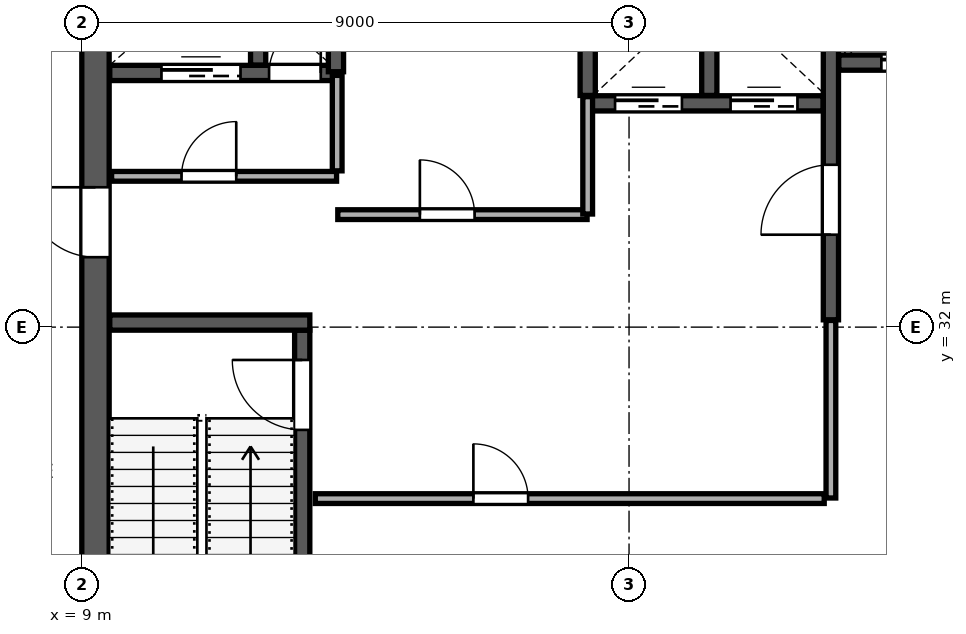
"""IFC4 building model, lengths in metres.
Left out: names, types, materials, properties, quantities, classifications, styles, units other than length and angle.
Written with IfcOpenShell. Run it as: python <this file> out.ifc"""

import sys

from ifc_helpers import new_model, si_unit, direction, frame, frame_2d, origin, place, context, subcontext, project, spatial, rectangle, extrude, source, transform, mapped, element, fill, save


model = new_model("IFC4")
c1 = context("Model", 3, precision=1e-05, world=origin(), true_north=direction((0.0, 1.0)))
c2 = subcontext(c1, "Body", "Model", "MODEL_VIEW")
j1 = project(units=[si_unit("LENGTHUNIT", "METRE"), si_unit("PLANEANGLEUNIT", "RADIAN")], contexts=[c1])
p1 = place(None, origin())
s1 = spatial("IfcSite", under=j1, at=p1, CompositionType="ELEMENT")
p2 = place(p1, origin())
s2 = spatial("IfcBuilding", under=s1, at=p2, CompositionType="ELEMENT")
p3 = place(p2, frame((0.0, 0.0, 254.2)))
s3 = spatial("IfcBuildingStorey", under=s2, at=p3, CompositionType="ELEMENT", Elevation=254.2)
p4 = place(p3, frame((9.225, 24.45, 0.0), z_axis=(0.0, 0.0, 1.0), x_axis=(0.0, 1.0, 0.0)))
e1 = element("IfcWall", 1, at=p4, inside=s3, PredefinedType="SHEAR", context=c2, shape_type="SweptSolid", body=[
    extrude(rectangle(XDim=15.1, YDim=0.45, at=frame_2d((7.55, 0.0))), origin(), (0.0, 0.0, 1.0), 3.96),
])
p5 = place(p4, frame((8.7, 0.0, 0.0)))
e2 = element("IfcOpeningElement", 2, at=p5, cuts=e1, PredefinedType="OPENING", context=c2, shape_type="SweptSolid", body=[
    extrude(rectangle(XDim=1.15, YDim=2.2, at=frame_2d((0.575, 1.1))), frame((0.0, 0.235, 0.0), z_axis=(0.0, -1.0, 0.0), x_axis=(1.0, 0.0, 0.0)), (0.0, 0.0, 1.0), 0.47),
])
p6 = place(p3, frame((12.625, 24.46, 0.0), z_axis=(0.0, 0.0, 1.0), x_axis=(0.0, 1.0, 0.0)))
e3 = element("IfcWall", 3, at=p6, inside=s3, PredefinedType="SHEAR", context=c2, shape_type="SweptSolid", body=[
    extrude(rectangle(XDim=7.49, YDim=0.25, at=frame_2d((3.745, 0.0))), origin(), (0.0, 0.0, 1.0), 3.96),
])
p7 = place(p6, frame((5.85, 0.0, 0.0)))
e4 = element("IfcOpeningElement", 4, at=p7, cuts=e3, PredefinedType="OPENING", context=c2, shape_type="SweptSolid", body=[
    extrude(rectangle(XDim=1.15, YDim=2.2, at=frame_2d((0.575, 1.1))), frame((0.0, 0.135, 0.0), z_axis=(0.0, -1.0, 0.0), x_axis=(1.0, 0.0, 0.0)), (0.0, 0.0, 1.0), 0.27),
])
p8 = place(p3, frame((9.46, 32.075, 0.0), z_axis=(0.0, 0.0, 1.0), x_axis=(1.0, 0.0, 0.0)))
e5 = element("IfcWall", 5, at=p8, inside=s3, PredefinedType="SHEAR", context=c2, shape_type="SweptSolid", body=[
    extrude(rectangle(XDim=3.29, YDim=0.25, at=frame_2d((1.645, 0.0))), origin(), (0.0, 0.0, 1.0), 3.96),
])
p9 = place(p3, frame((21.32, 32.12, 0.0), z_axis=(0.0, 0.0, 1.0), x_axis=(0.0, 1.0, 0.0)))
e6 = element("IfcWall", 6, at=p9, inside=s3, PredefinedType="SHEAR", context=c2, shape_type="SweptSolid", body=[
    extrude(rectangle(XDim=7.42, YDim=0.25, at=frame_2d((3.71, 0.0))), origin(), (0.0, 0.0, 1.0), 3.96),
])
p10 = place(p9, frame((1.4, 0.0, 0.0)))
e7 = element("IfcOpeningElement", 7, at=p10, cuts=e6, PredefinedType="OPENING", context=c2, shape_type="SweptSolid", body=[
    extrude(rectangle(XDim=1.15, YDim=2.2, at=frame_2d((0.575, 1.1))), frame((0.0, 0.135, 0.0), z_axis=(0.0, -1.0, 0.0), x_axis=(1.0, 0.0, 0.0)), (0.0, 0.0, 1.0), 0.27),
])
p11 = place(p3, frame((9.46, 36.18, 0.0), z_axis=(0.0, 0.0, 1.0), x_axis=(1.0, 0.0, 0.0)))
e8 = element("IfcWall", 8, at=p11, inside=s3, PredefinedType="SHEAR", context=c2, shape_type="SweptSolid", body=[
    extrude(rectangle(XDim=3.79, YDim=0.25, at=frame_2d((1.895, 0.0))), origin(), (0.0, 0.0, 1.0), 3.96),
])
p12 = place(p11, frame((2.62, 0.0, 0.0)))
e9 = element("IfcOpeningElement", 9, at=p12, cuts=e8, PredefinedType="OPENING", context=c2, shape_type="SweptSolid", body=[
    extrude(rectangle(XDim=0.85, YDim=2.1, at=frame_2d((0.425, 1.05))), frame((0.0, 0.135, 0.0), z_axis=(0.0, -1.0, 0.0), x_axis=(1.0, 0.0, 0.0)), (0.0, 0.0, 1.0), 0.27),
])
p13 = place(p11, frame((0.85, 0.0, 0.0)))
e10 = element("IfcOpeningElement", 10, at=p13, cuts=e8, PredefinedType="OPENING", context=c2, shape_type="SweptSolid", body=[
    extrude(rectangle(XDim=1.3, YDim=2.25, at=frame_2d((0.65, 1.125))), frame((0.0, 0.135, 0.0), z_axis=(0.0, -1.0, 0.0), x_axis=(1.0, 0.0, 0.0)), (0.0, 0.0, 1.0), 0.27),
])
p14 = place(p3, frame((11.9, 36.31, 0.0), z_axis=(0.0, 0.0, 1.0), x_axis=(0.0, 1.0, 0.0)))
e11 = element("IfcWall", 11, at=p14, inside=s3, PredefinedType="SHEAR", context=c2, shape_type="SweptSolid", body=[
    extrude(rectangle(XDim=3.23, YDim=0.25, at=frame_2d((1.615, 0.0))), origin(), (0.0, 0.0, 1.0), 3.96),
])
p15 = place(p3, frame((21.45, 36.35, 0.0), z_axis=(0.0, 0.0, 1.0), x_axis=(1.0, 0.0, 0.0)))
e12 = element("IfcWall", 12, at=p15, inside=s3, PredefinedType="SHEAR", context=c2, shape_type="SweptSolid", body=[
    extrude(rectangle(XDim=5.09, YDim=0.25, at=frame_2d((2.545, 0.0))), origin(), (0.0, 0.0, 1.0), 3.96),
])
p16 = place(p15, frame((0.7, 0.0, 0.0)))
e13 = element("IfcOpeningElement", 13, at=p16, cuts=e12, PredefinedType="OPENING", context=c2, shape_type="SweptSolid", body=[
    extrude(rectangle(XDim=1.2, YDim=2.2, at=frame_2d((0.6, 1.1))), frame((0.0, 0.135, 0.0), z_axis=(0.0, -1.0, 0.0), x_axis=(1.0, 0.0, 0.0)), (0.0, 0.0, 1.0), 0.27),
])
p17 = place(p15, frame((3.25, 0.0, 0.0)))
e14 = element("IfcOpeningElement", 14, at=p17, cuts=e12, PredefinedType="OPENING", context=c2, shape_type="SweptSolid", body=[
    extrude(rectangle(XDim=1.2, YDim=2.2, at=frame_2d((0.6, 1.1))), frame((0.0, 0.135, 0.0), z_axis=(0.0, -1.0, 0.0), x_axis=(1.0, 0.0, 0.0)), (0.0, 0.0, 1.0), 0.27),
])
p18 = place(p3, frame((13.18, 36.2, 0.0), z_axis=(0.0, 0.0, 1.0), x_axis=(0.0, 1.0, 0.0)))
e15 = element("IfcWall", 15, at=p18, inside=s3, PredefinedType="SHEAR", context=c2, shape_type="SweptSolid", body=[
    extrude(rectangle(XDim=3.34, YDim=0.25, at=frame_2d((1.67, 0.0))), origin(), (0.0, 0.0, 1.0), 3.96),
])
p19 = place(p3, frame((17.32, 35.68, 0.0), z_axis=(0.0, 0.0, 1.0), x_axis=(1.0, 0.0, 0.0)))
e16 = element("IfcWall", 16, at=p19, inside=s3, PredefinedType="SHEAR", context=c2, shape_type="SweptSolid", body=[
    extrude(rectangle(XDim=3.87, YDim=0.25, at=frame_2d((1.935, 0.0))), origin(), (0.0, 0.0, 1.0), 3.96),
])
p20 = place(p19, frame((0.45, 0.0, 0.0)))
e17 = element("IfcOpeningElement", 17, at=p20, cuts=e16, PredefinedType="OPENING", context=c2, shape_type="SweptSolid", body=[
    extrude(rectangle(XDim=1.1, YDim=2.2, at=frame_2d((0.55, 1.1))), frame((0.0, 0.135, 0.0), z_axis=(0.0, -1.0, 0.0), x_axis=(1.0, 0.0, 0.0)), (0.0, 0.0, 1.0), 0.27),
])
p21 = place(p19, frame((2.35, 0.0, 0.0)))
e18 = element("IfcOpeningElement", 18, at=p21, cuts=e16, PredefinedType="OPENING", context=c2, shape_type="SweptSolid", body=[
    extrude(rectangle(XDim=1.1, YDim=2.2, at=frame_2d((0.55, 1.1))), frame((0.0, 0.135, 0.0), z_axis=(0.0, -1.0, 0.0), x_axis=(1.0, 0.0, 0.0)), (0.0, 0.0, 1.0), 0.27),
])
for number, where, z_axis, x_axis in (
    (19, (17.32, 35.81, 0.0), (0.0, 0.0, 1.0), (0.0, 1.0, 0.0)),
    (20, (19.32, 35.81, 0.0), (0.0, 0.0, 1.0), (0.0, 1.0, 0.0)),
):
    element("IfcWall", number, at=place(p3, frame(where, z_axis=z_axis, x_axis=x_axis)), inside=s3, PredefinedType="SHEAR", context=c2, shape_type="SweptSolid", body=[
        extrude(rectangle(XDim=3.73, YDim=0.25, at=frame_2d((1.865, 0.0))), origin(), (0.0, 0.0, 1.0), 3.96),
    ])
p22 = place(p3, frame((9.49, 34.48, 0.0), z_axis=(0.0, 0.0, 1.0), x_axis=(1.0, 0.0, 0.0)))
e21 = element("IfcWall", 21, at=p22, inside=s3, PredefinedType="PARTITIONING", context=c2, shape_type="SweptSolid", body=[
    extrude(rectangle(XDim=3.7, YDim=0.16, at=frame_2d((1.85, 0.0))), origin(), (0.0, 0.0, 1.0), 3.96),
])
p23 = place(p22, frame((1.15, 0.0, 0.0)))
e22 = element("IfcOpeningElement", 22, at=p23, cuts=e21, PredefinedType="OPENING", context=c2, shape_type="SweptSolid", body=[
    extrude(rectangle(XDim=0.9, YDim=2.15, at=frame_2d((0.45, 1.075))), frame((0.0, 0.09, 0.0), z_axis=(0.0, -1.0, 0.0), x_axis=(1.0, 0.0, 0.0)), (0.0, 0.0, 1.0), 0.18),
])
p24 = place(p3, frame((13.2, 34.57, 0.0), z_axis=(0.0, 0.0, 1.0), x_axis=(0.0, 1.0, 0.0)))
e23 = element("IfcWall", 23, at=p24, inside=s3, PredefinedType="PARTITIONING", context=c2, shape_type="SweptSolid", body=[
    extrude(rectangle(XDim=1.57, YDim=0.16, at=frame_2d((0.785, 0.0))), origin(), (0.0, 0.0, 1.0), 3.96),
])
p25 = place(p3, frame((13.21, 33.85, 0.0), z_axis=(0.0, 0.0, 1.0), x_axis=(1.0, 0.0, 0.0)))
e24 = element("IfcWall", 24, at=p25, inside=s3, PredefinedType="PARTITIONING", context=c2, shape_type="SweptSolid", body=[
    extrude(rectangle(XDim=4.1, YDim=0.16, at=frame_2d((2.05, 0.0))), origin(), (0.0, 0.0, 1.0), 3.96),
])
p26 = place(p25, frame((1.35, 0.0, 0.0)))
e25 = element("IfcOpeningElement", 25, at=p26, cuts=e24, PredefinedType="OPENING", context=c2, shape_type="SweptSolid", body=[
    extrude(rectangle(XDim=0.9, YDim=2.15, at=frame_2d((0.45, 1.075))), frame((0.0, 0.09, 0.0), z_axis=(0.0, -1.0, 0.0), x_axis=(1.0, 0.0, 0.0)), (0.0, 0.0, 1.0), 0.18),
])
p27 = place(p3, frame((17.32, 33.86, 0.0), z_axis=(0.0, 0.0, 1.0), x_axis=(0.0, 1.0, 0.0)))
e26 = element("IfcWall", 26, at=p27, inside=s3, PredefinedType="PARTITIONING", context=c2, shape_type="SweptSolid", body=[
    extrude(rectangle(XDim=1.93, YDim=0.16, at=frame_2d((0.965, 0.0))), origin(), (0.0, 0.0, 1.0), 3.96),
])
p28 = place(p3, frame((12.84, 29.18, 0.0), z_axis=(0.0, 0.0, 1.0), x_axis=(1.0, 0.0, 0.0)))
e27 = element("IfcWall", 27, at=p28, inside=s3, PredefinedType="PARTITIONING", context=c2, shape_type="SweptSolid", body=[
    extrude(rectangle(XDim=8.37, YDim=0.16, at=frame_2d((4.185, 0.0))), origin(), (0.0, 0.0, 1.0), 3.96),
])
p29 = place(p28, frame((2.6, 0.0, 0.0)))
e28 = element("IfcOpeningElement", 28, at=p29, cuts=e27, PredefinedType="OPENING", context=c2, shape_type="SweptSolid", body=[
    extrude(rectangle(XDim=0.9, YDim=2.15, at=frame_2d((0.45, 1.075))), frame((0.0, 0.09, 0.0), z_axis=(0.0, -1.0, 0.0), x_axis=(1.0, 0.0, 0.0)), (0.0, 0.0, 1.0), 0.18),
])
p30 = place(p3, frame((21.32, 29.19, 0.0), z_axis=(0.0, 0.0, 1.0), x_axis=(0.0, 1.0, 0.0)))
e29 = element("IfcWall", 29, at=p30, inside=s3, PredefinedType="PARTITIONING", context=c2, shape_type="SweptSolid", body=[
    extrude(rectangle(XDim=2.92, YDim=0.16, at=frame_2d((1.46, 0.0))), origin(), (0.0, 0.0, 1.0), 3.96),
])
p31 = place(p3, frame((4.203, 28.778, 0.0), z_axis=(0.0, 0.0, 1.0), x_axis=(0.675591041558, -0.737276572642, 0.0)))
e30 = element("IfcWall", 30, at=p31, inside=s3, PredefinedType="PARTITIONING", context=c2, shape_type="SweptSolid", body=[
    extrude(rectangle(XDim=14.07, YDim=0.16, at=frame_2d((7.035, 0.0))), origin(), (0.0, 0.0, 1.0), 3.96),
])
p32 = place(p31, frame((1.15, 0.0, 0.0)))
e31 = element("IfcOpeningElement", 31, at=p32, cuts=e30, PredefinedType="OPENING", context=c2, shape_type="SweptSolid", body=[
    extrude(rectangle(XDim=0.95, YDim=2.15, at=frame_2d((0.475, 1.075))), frame((0.0, 0.09, 0.0), z_axis=(0.0, -1.0, 0.0), x_axis=(1.0, 0.0, 0.0)), (0.0, 0.0, 1.0), 0.18),
])
p33 = place(p3, frame((19.042, 50.92, 0.0), z_axis=(0.0, 0.0, 1.0), x_axis=(0.675589646996, -0.737277850523, 0.0)))
e32 = element("IfcWall", 32, at=p33, inside=s3, PredefinedType="PARTITIONING", context=c2, shape_type="SweptSolid", body=[
    extrude(rectangle(XDim=21.87, YDim=0.135, at=frame_2d((10.935, 0.0))), origin(), (0.0, 0.0, 1.0), 3.96),
])
p34 = place(p33, frame((5.4, 0.0, 0.0)))
e33 = element("IfcOpeningElement", 33, at=p34, cuts=e32, PredefinedType="OPENING", context=c2, shape_type="SweptSolid", body=[
    extrude(rectangle(XDim=0.95, YDim=2.15, at=frame_2d((0.475, 1.075))), frame((0.0, 0.078, 0.0), z_axis=(0.0, -1.0, 0.0), x_axis=(1.0, 0.0, 0.0)), (0.0, 0.0, 1.0), 0.155),
])
p35 = place(p33, frame((9.4, 0.0, 0.0)))
e34 = element("IfcOpeningElement", 34, at=p35, cuts=e32, PredefinedType="OPENING", context=c2, shape_type="SweptSolid", body=[
    extrude(rectangle(XDim=0.95, YDim=2.15, at=frame_2d((0.475, 1.075))), frame((0.0, 0.078, 0.0), z_axis=(0.0, -1.0, 0.0), x_axis=(1.0, 0.0, 0.0)), (0.0, 0.0, 1.0), 0.155),
])
p36 = place(p3, frame((1.393, 34.124, 0.0), z_axis=(0.0, 0.0, 1.0), x_axis=(0.737274323436, 0.675593496121, 0.0)))
e35 = element("IfcWall", 35, at=p36, inside=s3, PredefinedType="PARTITIONING", context=c2, shape_type="SweptSolid", body=[
    extrude(rectangle(XDim=27.402, YDim=0.135, at=frame_2d((13.701, 0.0))), origin(), (0.0, 0.0, 1.0), 3.96),
])
m1 = source(origin(), c2, "Body", "SweptSolid", [
    extrude(rectangle(XDim=1.15, YDim=2.2, at=frame_2d((0.575, 1.1))), frame((0.0, 0.025, 0.0), z_axis=(0.0, -1.0, 0.0), x_axis=(1.0, 0.0, 0.0)), (0.0, 0.0, 1.0), 0.05),
])
p37 = place(p7, origin())
e36 = element("IfcDoor", 36, at=p37, inside=s3, OperationType="SINGLE_SWING_RIGHT", PredefinedType="DOOR", context=c2, shape_type="MappedRepresentation", body=[
    mapped(m1, transform((0.0, 0.0, 0.0), scale=1.0)),
])
fill(e4, e36)
m2 = source(origin(), c2, "Body", "SweptSolid", [
    extrude(rectangle(XDim=1.15, YDim=2.2, at=frame_2d((0.575, 1.1))), frame((0.0, 0.025, 0.0), z_axis=(0.0, -1.0, 0.0), x_axis=(1.0, 0.0, 0.0)), (0.0, 0.0, 1.0), 0.05),
])
p38 = place(p10, origin())
e37 = element("IfcDoor", 37, at=p38, inside=s3, OperationType="SINGLE_SWING_LEFT", PredefinedType="DOOR", context=c2, shape_type="MappedRepresentation", body=[
    mapped(m2, transform((0.0, 0.0, 0.0), scale=1.0)),
])
fill(e7, e37)
p39 = place(p5, origin())
e38 = element("IfcDoor", 38, at=p39, inside=s3, OperationType="SINGLE_SWING_RIGHT", PredefinedType="DOOR", context=c2, shape_type="MappedRepresentation", body=[
    mapped(m2, transform((0.0, 0.0, 0.0), scale=1.0)),
])
fill(e2, e38)
m3 = source(origin(), c2, "Body", "SweptSolid", [
    extrude(rectangle(XDim=0.85, YDim=2.1, at=frame_2d((0.425, 1.05))), frame((0.0, 0.025, 0.0), z_axis=(0.0, -1.0, 0.0), x_axis=(1.0, 0.0, 0.0)), (0.0, 0.0, 1.0), 0.05),
])
p40 = place(p12, origin())
e39 = element("IfcDoor", 39, at=p40, inside=s3, OperationType="SINGLE_SWING_RIGHT", PredefinedType="DOOR", context=c2, shape_type="MappedRepresentation", body=[
    mapped(m3, transform((0.0, 0.0, 0.0), scale=1.0)),
])
fill(e9, e39)
m4 = source(origin(), c2, "Body", "SweptSolid", [
    extrude(rectangle(XDim=1.1, YDim=2.2, at=frame_2d((0.55, 1.1))), frame((0.0, 0.025, 0.0), z_axis=(0.0, -1.0, 0.0), x_axis=(1.0, 0.0, 0.0)), (0.0, 0.0, 1.0), 0.05),
])
p41 = place(p20, origin())
e40 = element("IfcDoor", 40, at=p41, inside=s3, OperationType="SLIDING_TO_LEFT", PredefinedType="DOOR", context=c2, shape_type="MappedRepresentation", body=[
    mapped(m4, transform((0.0, 0.0, 0.0), scale=1.0)),
])
fill(e17, e40)
p42 = place(p21, origin())
e41 = element("IfcDoor", 41, at=p42, inside=s3, OperationType="SLIDING_TO_RIGHT", PredefinedType="DOOR", context=c2, shape_type="MappedRepresentation", body=[
    mapped(m4, transform((0.0, 0.0, 0.0), scale=1.0)),
])
fill(e18, e41)
m5 = source(origin(), c2, "Body", "SweptSolid", [
    extrude(rectangle(XDim=1.2, YDim=2.2, at=frame_2d((0.6, 1.1))), frame((0.0, 0.025, 0.0), z_axis=(0.0, -1.0, 0.0), x_axis=(1.0, 0.0, 0.0)), (0.0, 0.0, 1.0), 0.05),
])
p43 = place(p16, origin())
e42 = element("IfcDoor", 42, at=p43, inside=s3, OperationType="SLIDING_TO_LEFT", PredefinedType="DOOR", context=c2, shape_type="MappedRepresentation", body=[
    mapped(m5, transform((0.0, 0.0, 0.0), scale=1.0)),
])
fill(e13, e42)
m6 = source(origin(), c2, "Body", "SweptSolid", [
    extrude(rectangle(XDim=1.3, YDim=2.25, at=frame_2d((0.65, 1.125))), frame((0.0, 0.025, 0.0), z_axis=(0.0, -1.0, 0.0), x_axis=(1.0, 0.0, 0.0)), (0.0, 0.0, 1.0), 0.05),
])
p44 = place(p13, origin())
e43 = element("IfcDoor", 43, at=p44, inside=s3, OperationType="SLIDING_TO_LEFT", PredefinedType="DOOR", context=c2, shape_type="MappedRepresentation", body=[
    mapped(m6, transform((0.0, 0.0, 0.0), scale=1.0)),
])
fill(e10, e43)
m7 = source(origin(), c2, "Body", "SweptSolid", [
    extrude(rectangle(XDim=0.9, YDim=2.15, at=frame_2d((0.45, 1.075))), frame((0.0, 0.025, 0.0), z_axis=(0.0, -1.0, 0.0), x_axis=(1.0, 0.0, 0.0)), (0.0, 0.0, 1.0), 0.05),
])
p45 = place(p23, origin())
e44 = element("IfcDoor", 44, at=p45, inside=s3, OperationType="SINGLE_SWING_RIGHT", PredefinedType="DOOR", context=c2, shape_type="MappedRepresentation", body=[
    mapped(m7, transform((0.0, 0.0, 0.0), scale=1.0)),
])
fill(e22, e44)
p46 = place(p26, origin())
e45 = element("IfcDoor", 45, at=p46, inside=s3, OperationType="SINGLE_SWING_LEFT", PredefinedType="DOOR", context=c2, shape_type="MappedRepresentation", body=[
    mapped(m7, transform((0.0, 0.0, 0.0), scale=1.0)),
])
fill(e25, e45)
p47 = place(p29, origin())
e46 = element("IfcDoor", 46, at=p47, inside=s3, OperationType="SINGLE_SWING_LEFT", PredefinedType="DOOR", context=c2, shape_type="MappedRepresentation", body=[
    mapped(m7, transform((0.0, 0.0, 0.0), scale=1.0)),
])
fill(e28, e46)
save(model, sys.argv[1])
